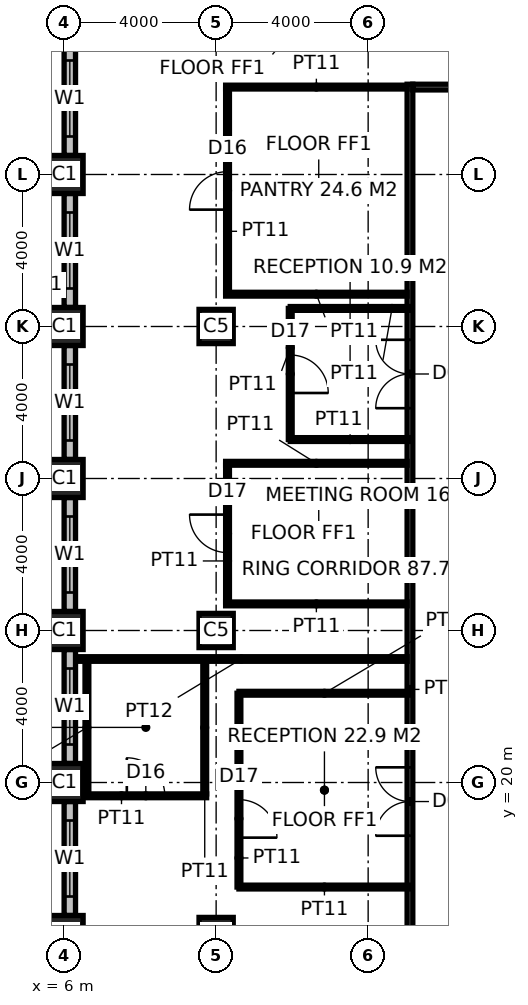
"""IFC4 building model, lengths in metres.
Left out: names, types, materials, properties, quantities, classifications, styles, units other than length and angle.
Written with IfcOpenShell. Run it as: python <this file> out.ifc"""

import sys

from ifc_helpers import new_model, si_unit, direction, frame, frame_2d, origin, origin_2d, place, context, subcontext, project, spatial, rectangle, hollow_rectangle, extrude, element, fill, save


model = new_model("IFC4")
c1 = context("Model", 3, precision=1e-05, world=origin(), true_north=direction((0.0, 1.0)))
c2 = subcontext(c1, "Body", "Model", "MODEL_VIEW")
j1 = project(units=[si_unit("LENGTHUNIT", "METRE"), si_unit("PLANEANGLEUNIT", "RADIAN")], contexts=[c1])
p1 = place(None, origin())
s1 = spatial("IfcSite", under=j1, at=p1, CompositionType="ELEMENT")
p2 = place(p1, origin())
s2 = spatial("IfcBuilding", under=s1, at=p2, CompositionType="ELEMENT")
p3 = place(p2, frame((0.0, 0.0, 179.8)))
s3 = spatial("IfcBuildingStorey", under=s2, at=p3, CompositionType="ELEMENT", Elevation=179.8)
for number, where, z_axis, x_axis in (
    (1, (6.0, 16.0, 0.0), (0.0, 0.0, 1.0), (1.0, 0.0, 0.0)),
    (2, (6.0, 20.0, 0.0), (0.0, 0.0, 1.0), (1.0, 0.0, 0.0)),
    (3, (6.0, 24.0, 0.0), (0.0, 0.0, 1.0), (1.0, 0.0, 0.0)),
    (4, (6.0, 28.0, 0.0), (0.0, 0.0, 1.0), (1.0, 0.0, 0.0)),
    (5, (6.0, 32.0, 0.0), (0.0, 0.0, 1.0), (1.0, 0.0, 0.0)),
    (6, (6.0, 36.0, 0.0), (0.0, 0.0, 1.0), (1.0, 0.0, 0.0)),
):
    element("IfcColumn", number, at=place(p3, frame(where, z_axis=z_axis, x_axis=x_axis)), inside=s3, PredefinedType="COLUMN", context=c2, shape_type="SweptSolid", body=[
        extrude(hollow_rectangle(XDim=1.0, YDim=1.0, WallThickness=0.1, at=origin_2d()), origin(), (0.0, 0.0, 1.0), 4.0),
    ])
for number, where, z_axis, x_axis in (
    (7, (10.0, 16.0, 0.0), (0.0, 0.0, 1.0), (1.0, 0.0, 0.0)),
    (8, (10.0, 24.0, 0.0), (0.0, 0.0, 1.0), (1.0, 0.0, 0.0)),
    (9, (10.0, 32.0, 0.0), (0.0, 0.0, 1.0), (1.0, 0.0, 0.0)),
):
    element("IfcColumn", number, at=place(p3, frame(where, z_axis=z_axis, x_axis=x_axis)), inside=s3, PredefinedType="COLUMN", context=c2, shape_type="SweptSolid", body=[
        extrude(hollow_rectangle(XDim=0.9, YDim=0.9, WallThickness=0.1, at=origin_2d()), origin(), (0.0, 0.0, 1.0), 4.0),
    ])
p4 = place(p3, frame((15.1, 15.625, 0.0), z_axis=(0.0, 0.0, 1.0), x_axis=(0.0, 1.0, 0.0)))
e10 = element("IfcWall", 10, at=p4, inside=s3, PredefinedType="PARTITIONING", context=c2, shape_type="SweptSolid", body=[
    extrude(rectangle(XDim=22.75, YDim=0.15, at=frame_2d((11.375, 0.0))), origin(), (0.0, 0.0, 1.0), 3.85),
])
p5 = place(p4, frame((2.974, 0.0, 0.0)))
e11 = element("IfcOpeningElement", 11, at=p5, cuts=e10, PredefinedType="OPENING", context=c2, shape_type="SweptSolid", body=[
    extrude(rectangle(XDim=1.8, YDim=2.4, at=frame_2d((0.9, 1.2))), frame((0.0, 0.085, 0.0), z_axis=(0.0, -1.0, 0.0), x_axis=(1.0, 0.0, 0.0)), (0.0, 0.0, 1.0), 0.17),
])
p6 = place(p4, frame((14.225, 0.0, 0.0)))
e12 = element("IfcOpeningElement", 12, at=p6, cuts=e10, PredefinedType="OPENING", context=c2, shape_type="SweptSolid", body=[
    extrude(rectangle(XDim=1.8, YDim=2.4, at=frame_2d((0.9, 1.2))), frame((0.0, 0.085, 0.0), z_axis=(0.0, -1.0, 0.0), x_axis=(1.0, 0.0, 0.0)), (0.0, 0.0, 1.0), 0.17),
])
p7 = place(p3, frame((15.175, 38.3, 0.0), z_axis=(0.0, 0.0, 1.0), x_axis=(1.0, 0.0, 0.0)))
e13 = element("IfcWall", 13, at=p7, inside=s3, PredefinedType="PARTITIONING", context=c2, shape_type="SweptSolid", body=[
    extrude(rectangle(XDim=22.65, YDim=0.15, at=frame_2d((11.325, 0.0))), origin(), (0.0, 0.0, 1.0), 3.85),
])
p8 = place(p7, frame((8.575, 0.0, 0.0)))
e14 = element("IfcOpeningElement", 14, at=p8, cuts=e13, PredefinedType="OPENING", context=c2, shape_type="SweptSolid", body=[
    extrude(rectangle(XDim=0.9, YDim=2.1, at=frame_2d((0.45, 1.05))), frame((0.0, 0.085, 0.0), z_axis=(0.0, -1.0, 0.0), x_axis=(1.0, 0.0, 0.0)), (0.0, 0.0, 1.0), 0.17),
])
p9 = place(p7, frame((12.325, 0.0, 0.0)))
e15 = element("IfcOpeningElement", 15, at=p9, cuts=e13, PredefinedType="OPENING", context=c2, shape_type="SweptSolid", body=[
    extrude(rectangle(XDim=1.0, YDim=2.1, at=frame_2d((0.5, 1.05))), frame((0.0, 0.085, 0.0), z_axis=(0.0, -1.0, 0.0), x_axis=(1.0, 0.0, 0.0)), (0.0, 0.0, 1.0), 0.17),
])
p10 = place(p7, frame((16.175, 0.0, 0.0)))
e16 = element("IfcOpeningElement", 16, at=p10, cuts=e13, PredefinedType="OPENING", context=c2, shape_type="SweptSolid", body=[
    extrude(rectangle(XDim=0.9, YDim=2.1, at=frame_2d((0.45, 1.05))), frame((0.0, 0.085, 0.0), z_axis=(0.0, -1.0, 0.0), x_axis=(1.0, 0.0, 0.0)), (0.0, 0.0, 1.0), 0.17),
])
p11 = place(p3, frame((6.3, 23.25, 0.0), z_axis=(0.0, 0.0, 1.0), x_axis=(1.0, 0.0, 0.0)))
e17 = element("IfcWall", 17, at=p11, inside=s3, PredefinedType="PARTITIONING", context=c2, shape_type="SweptSolid", body=[
    extrude(rectangle(XDim=8.725, YDim=0.12, at=frame_2d((4.362, 0.0))), origin(), (0.0, 0.0, 1.0), 3.85),
])
p12 = place(p3, frame((6.55, 19.65, 0.0), z_axis=(0.0, 0.0, 1.0), x_axis=(1.0, 0.0, 0.0)))
e18 = element("IfcWall", 18, at=p12, inside=s3, PredefinedType="PARTITIONING", context=c2, shape_type="SweptSolid", body=[
    extrude(rectangle(XDim=3.2, YDim=0.1, at=frame_2d((1.6, 0.0))), origin(), (0.0, 0.0, 1.0), 2.85),
])
p13 = place(p12, frame((1.1, 0.0, 0.0)))
e19 = element("IfcOpeningElement", 19, at=p13, cuts=e18, PredefinedType="OPENING", context=c2, shape_type="SweptSolid", body=[
    extrude(rectangle(XDim=1.0, YDim=2.2, at=frame_2d((0.5, 1.1))), frame((0.0, 0.06, 0.0), z_axis=(0.0, -1.0, 0.0), x_axis=(1.0, 0.0, 0.0)), (0.0, 0.0, 1.0), 0.12),
])
for number, where, z_axis, x_axis in (
    (20, (10.25, 24.7, 0.0), (0.0, 0.0, 1.0), (1.0, 0.0, 0.0)),
    (21, (10.25, 28.4, 0.0), (0.0, 0.0, 1.0), (1.0, 0.0, 0.0)),
    (22, (10.25, 32.85, 0.0), (0.0, 0.0, 1.0), (1.0, 0.0, 0.0)),
    (23, (10.25, 38.3, 0.0), (0.0, 0.0, 1.0), (1.0, 0.0, 0.0)),
):
    element("IfcWall", number, at=place(p3, frame(where, z_axis=z_axis, x_axis=x_axis)), inside=s3, PredefinedType="PARTITIONING", context=c2, shape_type="SweptSolid", body=[
        extrude(rectangle(XDim=4.775, YDim=0.1, at=frame_2d((2.387, 0.0))), origin(), (0.0, 0.0, 1.0), 3.85),
    ])
for number, where, z_axis, x_axis in (
    (24, (6.6, 19.7, 0.0), (0.0, 0.0, 1.0), (0.0, 1.0, 0.0)),
    (25, (9.7, 19.7, 0.0), (0.0, 0.0, 1.0), (0.0, 1.0, 0.0)),
):
    element("IfcWall", number, at=place(p3, frame(where, z_axis=z_axis, x_axis=x_axis)), inside=s3, PredefinedType="PARTITIONING", context=c2, shape_type="SweptSolid", body=[
        extrude(rectangle(XDim=3.49, YDim=0.1, at=frame_2d((1.745, 0.0))), origin(), (0.0, 0.0, 1.0), 3.85),
    ])
p14 = place(p3, frame((10.3, 24.75, 0.0), z_axis=(0.0, 0.0, 1.0), x_axis=(0.0, 1.0, 0.0)))
e26 = element("IfcWall", 26, at=p14, inside=s3, PredefinedType="PARTITIONING", context=c2, shape_type="SweptSolid", body=[
    extrude(rectangle(XDim=3.6, YDim=0.1, at=frame_2d((1.8, 0.0))), origin(), (0.0, 0.0, 1.0), 3.85),
])
p15 = place(p14, frame((1.3, 0.0, 0.0)))
e27 = element("IfcOpeningElement", 27, at=p15, cuts=e26, PredefinedType="OPENING", context=c2, shape_type="SweptSolid", body=[
    extrude(rectangle(XDim=1.0, YDim=2.2, at=frame_2d((0.5, 1.1))), frame((0.0, 0.06, 0.0), z_axis=(0.0, -1.0, 0.0), x_axis=(1.0, 0.0, 0.0)), (0.0, 0.0, 1.0), 0.12),
])
p16 = place(p3, frame((10.3, 32.9, 0.0), z_axis=(0.0, 0.0, 1.0), x_axis=(0.0, 1.0, 0.0)))
e28 = element("IfcWall", 28, at=p16, inside=s3, PredefinedType="PARTITIONING", context=c2, shape_type="SweptSolid", body=[
    extrude(rectangle(XDim=5.35, YDim=0.1, at=frame_2d((2.675, 0.0))), origin(), (0.0, 0.0, 1.0), 2.95),
])
p17 = place(p16, frame((2.175, 0.0, 0.0)))
e29 = element("IfcOpeningElement", 29, at=p17, cuts=e28, PredefinedType="OPENING", context=c2, shape_type="SweptSolid", body=[
    extrude(rectangle(XDim=1.0, YDim=2.2, at=frame_2d((0.5, 1.1))), frame((0.0, 0.06, 0.0), z_axis=(0.0, -1.0, 0.0), x_axis=(1.0, 0.0, 0.0)), (0.0, 0.0, 1.0), 0.12),
])
p18 = place(p3, frame((15.1, 22.349, 0.0), z_axis=(0.0, 0.0, 1.0), x_axis=(-1.0, 0.0, 0.0)))
e30 = element("IfcWall", 30, at=p18, inside=s3, PredefinedType="PARTITIONING", context=c2, shape_type="SweptSolid", body=[
    extrude(rectangle(XDim=4.5, YDim=0.1, at=frame_2d((2.25, 0.0))), origin(), (0.0, 0.0, 1.0), 3.85),
])
p19 = place(p3, frame((10.6, 22.349, 0.0), z_axis=(0.0, 0.0, 1.0), x_axis=(0.0, -1.0, 0.0)))
e31 = element("IfcWall", 31, at=p19, inside=s3, PredefinedType="PARTITIONING", context=c2, shape_type="SweptSolid", body=[
    extrude(rectangle(XDim=5.1, YDim=0.1, at=frame_2d((2.55, 0.0))), origin(), (0.0, 0.0, 1.0), 3.85),
])
p20 = place(p19, frame((2.8, 0.0, 0.0)))
e32 = element("IfcOpeningElement", 32, at=p20, cuts=e31, PredefinedType="OPENING", context=c2, shape_type="SweptSolid", body=[
    extrude(rectangle(XDim=1.0, YDim=2.2, at=frame_2d((0.5, 1.1))), frame((0.0, 0.06, 0.0), z_axis=(0.0, -1.0, 0.0), x_axis=(1.0, 0.0, 0.0)), (0.0, 0.0, 1.0), 0.12),
])
p21 = place(p3, frame((10.6, 17.249, 0.0), z_axis=(0.0, 0.0, 1.0), x_axis=(1.0, 0.0, 0.0)))
e33 = element("IfcWall", 33, at=p21, inside=s3, PredefinedType="PARTITIONING", context=c2, shape_type="SweptSolid", body=[
    extrude(rectangle(XDim=4.5, YDim=0.1, at=frame_2d((2.25, 0.0))), origin(), (0.0, 0.0, 1.0), 3.85),
])
p22 = place(p3, frame((15.1, 32.475, 0.0), z_axis=(0.0, 0.0, 1.0), x_axis=(-1.0, 0.0, 0.0)))
e34 = element("IfcWall", 34, at=p22, inside=s3, PredefinedType="PARTITIONING", context=c2, shape_type="SweptSolid", body=[
    extrude(rectangle(XDim=3.15, YDim=0.1, at=frame_2d((1.575, 0.0))), origin(), (0.0, 0.0, 1.0), 3.85),
])
p23 = place(p3, frame((11.95, 32.475, 0.0), z_axis=(0.0, 0.0, 1.0), x_axis=(0.0, -1.0, 0.0)))
e35 = element("IfcWall", 35, at=p23, inside=s3, PredefinedType="PARTITIONING", context=c2, shape_type="SweptSolid", body=[
    extrude(rectangle(XDim=3.45, YDim=0.1, at=frame_2d((1.725, 0.0))), origin(), (0.0, 0.0, 1.0), 3.85),
])
p24 = place(p23, frame((1.225, 0.0, 0.0)))
e36 = element("IfcOpeningElement", 36, at=p24, cuts=e35, PredefinedType="OPENING", context=c2, shape_type="SweptSolid", body=[
    extrude(rectangle(XDim=1.0, YDim=2.2, at=frame_2d((0.5, 1.1))), frame((0.0, 0.06, 0.0), z_axis=(0.0, -1.0, 0.0), x_axis=(1.0, 0.0, 0.0)), (0.0, 0.0, 1.0), 0.12),
])
p25 = place(p3, frame((11.95, 29.025, 0.0), z_axis=(0.0, 0.0, 1.0), x_axis=(1.0, 0.0, 0.0)))
e37 = element("IfcWall", 37, at=p25, inside=s3, PredefinedType="PARTITIONING", context=c2, shape_type="SweptSolid", body=[
    extrude(rectangle(XDim=3.15, YDim=0.1, at=frame_2d((1.575, 0.0))), origin(), (0.0, 0.0, 1.0), 3.85),
])
p26 = place(p3, frame((6.15, 19.5, 0.0), z_axis=(0.0, 0.0, 1.0), x_axis=(0.0, -1.0, 0.0)))
e38 = element("IfcWall", 38, at=p26, inside=s3, PredefinedType="ELEMENTEDWALL", context=c2, shape_type="SweptSolid", body=[
    extrude(rectangle(XDim=3.0, YDim=0.3, at=frame_2d((1.5, 0.0))), origin(), (0.0, 0.0, 1.0), 2.85),
])
p27 = place(p26, frame((0.5, 0.0, 0.8)))
e39 = element("IfcOpeningElement", 39, at=p27, cuts=e38, PredefinedType="OPENING", context=c2, shape_type="SweptSolid", body=[
    extrude(rectangle(XDim=2.0, YDim=2.0, at=frame_2d((1.0, 1.0))), frame((0.0, 0.16, 0.0), z_axis=(0.0, -1.0, 0.0), x_axis=(1.0, 0.0, 0.0)), (0.0, 0.0, 1.0), 0.32),
])
p28 = place(p3, frame((6.15, 23.5, 0.0), z_axis=(0.0, 0.0, 1.0), x_axis=(0.0, -1.0, 0.0)))
e40 = element("IfcWall", 40, at=p28, inside=s3, PredefinedType="ELEMENTEDWALL", context=c2, shape_type="SweptSolid", body=[
    extrude(rectangle(XDim=3.0, YDim=0.3, at=frame_2d((1.5, 0.0))), origin(), (0.0, 0.0, 1.0), 2.85),
])
p29 = place(p28, frame((0.5, 0.0, 0.8)))
e41 = element("IfcOpeningElement", 41, at=p29, cuts=e40, PredefinedType="OPENING", context=c2, shape_type="SweptSolid", body=[
    extrude(rectangle(XDim=2.0, YDim=2.0, at=frame_2d((1.0, 1.0))), frame((0.0, 0.16, 0.0), z_axis=(0.0, -1.0, 0.0), x_axis=(1.0, 0.0, 0.0)), (0.0, 0.0, 1.0), 0.32),
])
p30 = place(p3, frame((6.15, 27.5, 0.0), z_axis=(0.0, 0.0, 1.0), x_axis=(0.0, -1.0, 0.0)))
e42 = element("IfcWall", 42, at=p30, inside=s3, PredefinedType="ELEMENTEDWALL", context=c2, shape_type="SweptSolid", body=[
    extrude(rectangle(XDim=3.0, YDim=0.3, at=frame_2d((1.5, 0.0))), origin(), (0.0, 0.0, 1.0), 2.85),
])
p31 = place(p30, frame((0.5, 0.0, 0.8)))
e43 = element("IfcOpeningElement", 43, at=p31, cuts=e42, PredefinedType="OPENING", context=c2, shape_type="SweptSolid", body=[
    extrude(rectangle(XDim=2.0, YDim=2.0, at=frame_2d((1.0, 1.0))), frame((0.0, 0.16, 0.0), z_axis=(0.0, -1.0, 0.0), x_axis=(1.0, 0.0, 0.0)), (0.0, 0.0, 1.0), 0.32),
])
p32 = place(p3, frame((6.15, 31.5, 0.0), z_axis=(0.0, 0.0, 1.0), x_axis=(0.0, -1.0, 0.0)))
e44 = element("IfcWall", 44, at=p32, inside=s3, PredefinedType="ELEMENTEDWALL", context=c2, shape_type="SweptSolid", body=[
    extrude(rectangle(XDim=3.0, YDim=0.3, at=frame_2d((1.5, 0.0))), origin(), (0.0, 0.0, 1.0), 2.85),
])
p33 = place(p32, frame((0.5, 0.0, 0.8)))
e45 = element("IfcOpeningElement", 45, at=p33, cuts=e44, PredefinedType="OPENING", context=c2, shape_type="SweptSolid", body=[
    extrude(rectangle(XDim=2.0, YDim=2.0, at=frame_2d((1.0, 1.0))), frame((0.0, 0.16, 0.0), z_axis=(0.0, -1.0, 0.0), x_axis=(1.0, 0.0, 0.0)), (0.0, 0.0, 1.0), 0.32),
])
p34 = place(p3, frame((6.15, 35.5, 0.0), z_axis=(0.0, 0.0, 1.0), x_axis=(0.0, -1.0, 0.0)))
e46 = element("IfcWall", 46, at=p34, inside=s3, PredefinedType="ELEMENTEDWALL", context=c2, shape_type="SweptSolid", body=[
    extrude(rectangle(XDim=3.0, YDim=0.3, at=frame_2d((1.5, 0.0))), origin(), (0.0, 0.0, 1.0), 2.85),
])
p35 = place(p34, frame((0.5, 0.0, 0.8)))
e47 = element("IfcOpeningElement", 47, at=p35, cuts=e46, PredefinedType="OPENING", context=c2, shape_type="SweptSolid", body=[
    extrude(rectangle(XDim=2.0, YDim=2.0, at=frame_2d((1.0, 1.0))), frame((0.0, 0.16, 0.0), z_axis=(0.0, -1.0, 0.0), x_axis=(1.0, 0.0, 0.0)), (0.0, 0.0, 1.0), 0.32),
])
p36 = place(p3, frame((6.15, 39.5, 0.0), z_axis=(0.0, 0.0, 1.0), x_axis=(0.0, -1.0, 0.0)))
e48 = element("IfcWall", 48, at=p36, inside=s3, PredefinedType="ELEMENTEDWALL", context=c2, shape_type="SweptSolid", body=[
    extrude(rectangle(XDim=3.0, YDim=0.3, at=frame_2d((1.5, 0.0))), origin(), (0.0, 0.0, 1.0), 2.85),
])
p37 = place(p36, frame((0.5, 0.0, 0.8)))
e49 = element("IfcOpeningElement", 49, at=p37, cuts=e48, PredefinedType="OPENING", context=c2, shape_type="SweptSolid", body=[
    extrude(rectangle(XDim=2.0, YDim=2.0, at=frame_2d((1.0, 1.0))), frame((0.0, 0.16, 0.0), z_axis=(0.0, -1.0, 0.0), x_axis=(1.0, 0.0, 0.0)), (0.0, 0.0, 1.0), 0.32),
])
p38 = place(p5, origin())
e50 = element("IfcDoor", 50, at=p38, inside=s3, OperationType="DOUBLE_DOOR_DOUBLE_SWING", PredefinedType="DOOR", context=c2, shape_type="SweptSolid", body=[
    extrude(rectangle(XDim=1.8, YDim=2.4, at=frame_2d((0.9, 1.2))), frame((0.0, 0.025, 0.0), z_axis=(0.0, -1.0, 0.0), x_axis=(1.0, 0.0, 0.0)), (0.0, 0.0, 1.0), 0.05),
])
fill(e11, e50)
p39 = place(p6, origin())
e51 = element("IfcDoor", 51, at=p39, inside=s3, OperationType="DOUBLE_DOOR_DOUBLE_SWING", PredefinedType="DOOR", context=c2, shape_type="SweptSolid", body=[
    extrude(rectangle(XDim=1.8, YDim=2.4, at=frame_2d((0.9, 1.2))), frame((0.0, 0.025, 0.0), z_axis=(0.0, -1.0, 0.0), x_axis=(1.0, 0.0, 0.0)), (0.0, 0.0, 1.0), 0.05),
])
fill(e12, e51)
p40 = place(p17, origin())
e52 = element("IfcDoor", 52, at=p40, inside=s3, OperationType="SINGLE_SWING_LEFT", PredefinedType="DOOR", context=c2, shape_type="SweptSolid", body=[
    extrude(rectangle(XDim=1.0, YDim=2.2, at=frame_2d((0.5, 1.1))), frame((0.0, 0.025, 0.0), z_axis=(0.0, -1.0, 0.0), x_axis=(1.0, 0.0, 0.0)), (0.0, 0.0, 1.0), 0.05),
])
fill(e29, e52)
p41 = place(p13, origin())
e53 = element("IfcDoor", 53, at=p41, inside=s3, OperationType="SINGLE_SWING_LEFT", PredefinedType="DOOR", context=c2, shape_type="SweptSolid", body=[
    extrude(rectangle(XDim=1.0, YDim=2.2, at=frame_2d((0.5, 1.1))), frame((0.0, 0.025, 0.0), z_axis=(0.0, -1.0, 0.0), x_axis=(1.0, 0.0, 0.0)), (0.0, 0.0, 1.0), 0.05),
])
fill(e19, e53)
p42 = place(p15, origin())
e54 = element("IfcDoor", 54, at=p42, inside=s3, OperationType="SINGLE_SWING_RIGHT", PredefinedType="DOOR", context=c2, shape_type="SweptSolid", body=[
    extrude(rectangle(XDim=1.0, YDim=2.2, at=frame_2d((0.5, 1.1))), frame((0.0, 0.025, 0.0), z_axis=(0.0, -1.0, 0.0), x_axis=(1.0, 0.0, 0.0)), (0.0, 0.0, 1.0), 0.05),
])
fill(e27, e54)
p43 = place(p20, origin())
e55 = element("IfcDoor", 55, at=p43, inside=s3, OperationType="SINGLE_SWING_RIGHT", PredefinedType="DOOR", context=c2, shape_type="SweptSolid", body=[
    extrude(rectangle(XDim=1.0, YDim=2.2, at=frame_2d((0.5, 1.1))), frame((0.0, 0.025, 0.0), z_axis=(0.0, -1.0, 0.0), x_axis=(1.0, 0.0, 0.0)), (0.0, 0.0, 1.0), 0.05),
])
fill(e32, e55)
p44 = place(p24, origin())
e56 = element("IfcDoor", 56, at=p44, inside=s3, OperationType="SINGLE_SWING_RIGHT", PredefinedType="DOOR", context=c2, shape_type="SweptSolid", body=[
    extrude(rectangle(XDim=1.0, YDim=2.2, at=frame_2d((0.5, 1.1))), frame((0.0, 0.025, 0.0), z_axis=(0.0, -1.0, 0.0), x_axis=(1.0, 0.0, 0.0)), (0.0, 0.0, 1.0), 0.05),
])
fill(e36, e56)
p45 = place(p27, origin())
e57 = element("IfcWindow", 57, at=p45, inside=s3, PartitioningType="SINGLE_PANEL", PredefinedType="WINDOW", context=c2, shape_type="SweptSolid", body=[
    extrude(rectangle(XDim=2.0, YDim=2.0, at=frame_2d((1.0, 1.0))), frame((0.0, 0.03, 0.0), z_axis=(0.0, -1.0, 0.0), x_axis=(1.0, 0.0, 0.0)), (0.0, 0.0, 1.0), 0.06),
])
fill(e39, e57)
p46 = place(p29, origin())
e58 = element("IfcWindow", 58, at=p46, inside=s3, PartitioningType="SINGLE_PANEL", PredefinedType="WINDOW", context=c2, shape_type="SweptSolid", body=[
    extrude(rectangle(XDim=2.0, YDim=2.0, at=frame_2d((1.0, 1.0))), frame((0.0, 0.03, 0.0), z_axis=(0.0, -1.0, 0.0), x_axis=(1.0, 0.0, 0.0)), (0.0, 0.0, 1.0), 0.06),
])
fill(e41, e58)
p47 = place(p31, origin())
e59 = element("IfcWindow", 59, at=p47, inside=s3, PartitioningType="SINGLE_PANEL", PredefinedType="WINDOW", context=c2, shape_type="SweptSolid", body=[
    extrude(rectangle(XDim=2.0, YDim=2.0, at=frame_2d((1.0, 1.0))), frame((0.0, 0.03, 0.0), z_axis=(0.0, -1.0, 0.0), x_axis=(1.0, 0.0, 0.0)), (0.0, 0.0, 1.0), 0.06),
])
fill(e43, e59)
p48 = place(p33, origin())
e60 = element("IfcWindow", 60, at=p48, inside=s3, PartitioningType="SINGLE_PANEL", PredefinedType="WINDOW", context=c2, shape_type="SweptSolid", body=[
    extrude(rectangle(XDim=2.0, YDim=2.0, at=frame_2d((1.0, 1.0))), frame((0.0, 0.03, 0.0), z_axis=(0.0, -1.0, 0.0), x_axis=(1.0, 0.0, 0.0)), (0.0, 0.0, 1.0), 0.06),
])
fill(e45, e60)
p49 = place(p35, origin())
e61 = element("IfcWindow", 61, at=p49, inside=s3, PartitioningType="SINGLE_PANEL", PredefinedType="WINDOW", context=c2, shape_type="SweptSolid", body=[
    extrude(rectangle(XDim=2.0, YDim=2.0, at=frame_2d((1.0, 1.0))), frame((0.0, 0.03, 0.0), z_axis=(0.0, -1.0, 0.0), x_axis=(1.0, 0.0, 0.0)), (0.0, 0.0, 1.0), 0.06),
])
fill(e47, e61)
p50 = place(p37, origin())
e62 = element("IfcWindow", 62, at=p50, inside=s3, PartitioningType="SINGLE_PANEL", PredefinedType="WINDOW", context=c2, shape_type="SweptSolid", body=[
    extrude(rectangle(XDim=2.0, YDim=2.0, at=frame_2d((1.0, 1.0))), frame((0.0, 0.03, 0.0), z_axis=(0.0, -1.0, 0.0), x_axis=(1.0, 0.0, 0.0)), (0.0, 0.0, 1.0), 0.06),
])
fill(e49, e62)
save(model, sys.argv[1])
